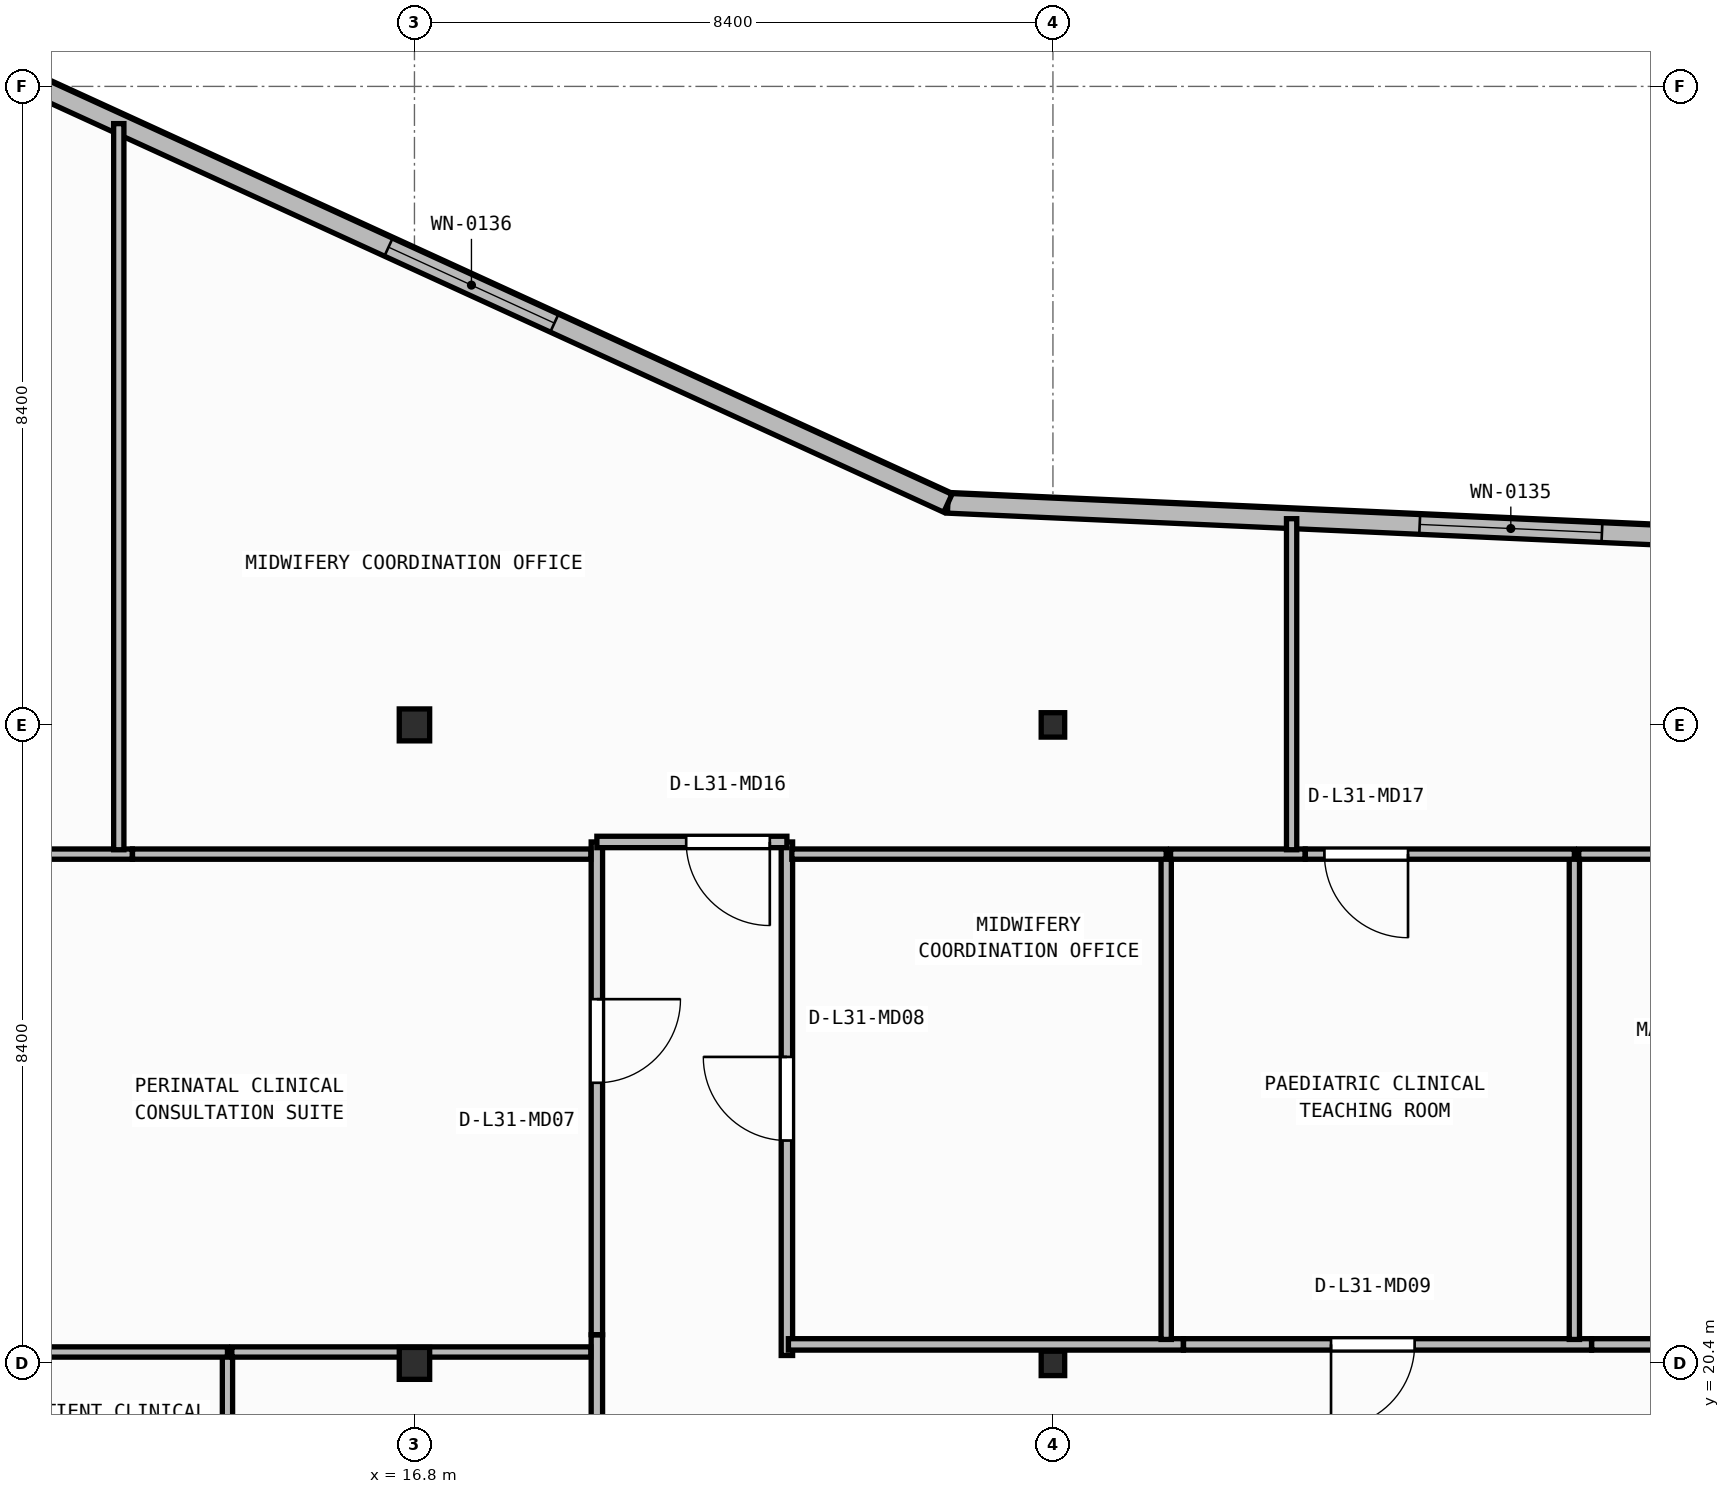
"""IFC4 building model, lengths in metres.
Left out: names, types, materials, properties, quantities, classifications, styles, units other than length and angle.
Written with IfcOpenShell. Run it as: python <this file> out.ifc"""

import sys

from ifc_helpers import new_model, si_unit, direction, frame, frame_2d, origin, origin_2d, place, context, subcontext, project, spatial, rectangle, i_section, extrude, element, fill, save


model = new_model("IFC4")
c1 = context("Model", 3, precision=1e-05, world=origin(), true_north=direction((0.0, 1.0)))
c2 = subcontext(c1, "Body", "Model", "MODEL_VIEW")
j1 = project(units=[si_unit("LENGTHUNIT", "METRE"), si_unit("PLANEANGLEUNIT", "RADIAN")], contexts=[c1])
p1 = place(None, origin())
s1 = spatial("IfcSite", under=j1, at=p1, CompositionType="ELEMENT")
p2 = place(p1, origin())
s2 = spatial("IfcBuilding", under=s1, at=p2, CompositionType="ELEMENT")
p3 = place(p2, frame((0.0, 0.0, 127.05)))
s3 = spatial("IfcBuildingStorey", under=s2, at=p3, CompositionType="ELEMENT", Elevation=127.05)
p4 = place(p3, frame((16.8, 20.4, 0.0), z_axis=(0.0, 0.0, 1.0), x_axis=(1.0, 0.0, 0.0)))
e1 = element("IfcColumn", 1, at=p4, inside=s3, PredefinedType="COLUMN", context=c2, shape_type="SweptSolid", body=[
    extrude(i_section(OverallWidth=0.4, OverallDepth=0.42, WebThickness=0.025, FlangeThickness=0.04, at=origin_2d()), origin(), (0.0, 0.0, 1.0), 3.95),
])
p5 = place(p3, frame((25.2, 20.4, 0.0), z_axis=(0.0, 0.0, 1.0), x_axis=(1.0, 0.0, 0.0)))
e2 = element("IfcColumn", 2, at=p5, inside=s3, PredefinedType="COLUMN", context=c2, shape_type="SweptSolid", body=[
    extrude(i_section(OverallWidth=0.309, OverallDepth=0.321, WebThickness=0.014, FlangeThickness=0.022, FilletRadius=0.017, at=origin_2d()), origin(), (0.0, 0.0, 1.0), 3.95),
])
p6 = place(p3, frame((16.8, 28.8, 0.0), z_axis=(0.0, 0.0, 1.0), x_axis=(1.0, 0.0, 0.0)))
e3 = element("IfcColumn", 3, at=p6, inside=s3, PredefinedType="COLUMN", context=c2, shape_type="SweptSolid", body=[
    extrude(i_section(OverallWidth=0.4, OverallDepth=0.42, WebThickness=0.025, FlangeThickness=0.04, at=origin_2d()), origin(), (0.0, 0.0, 1.0), 3.95),
])
p7 = place(p3, frame((25.2, 28.8, 0.0), z_axis=(0.0, 0.0, 1.0), x_axis=(1.0, 0.0, 0.0)))
e4 = element("IfcColumn", 4, at=p7, inside=s3, PredefinedType="COLUMN", context=c2, shape_type="SweptSolid", body=[
    extrude(i_section(OverallWidth=0.309, OverallDepth=0.321, WebThickness=0.014, FlangeThickness=0.022, FilletRadius=0.017, at=origin_2d()), origin(), (0.0, 0.0, 1.0), 3.95),
])
p8 = place(p3, frame((38.63, 31.052, 0.0), z_axis=(0.0, 0.0, 1.0), x_axis=(-0.998996592956, 0.044786239663, 0.0)))
e5 = element("IfcWall", 5, at=p8, inside=s3, PredefinedType="STANDARD", context=c2, shape_type="SweptSolid", body=[
    extrude(rectangle(XDim=14.827, YDim=0.26, at=frame_2d((7.414, 0.0))), origin(), (0.0, 0.0, 1.0), 3.71),
])
p9 = place(p8, frame((6.214, 0.0, 0.9)))
e6 = element("IfcOpeningElement", 6, at=p9, cuts=e5, PredefinedType="OPENING", context=c2, shape_type="SweptSolid", body=[
    extrude(rectangle(XDim=2.4, YDim=1.65, at=frame_2d((1.2, 0.825))), frame((0.0, 0.14, 0.0), z_axis=(0.0, -1.0, 0.0), x_axis=(1.0, 0.0, 0.0)), (0.0, 0.0, 1.0), 0.28),
])
p10 = place(p3, frame((23.818, 31.716, 0.0), z_axis=(0.0, 0.0, 1.0), x_axis=(-0.909209527513, 0.416338846471, 0.0)))
e7 = element("IfcWall", 7, at=p10, inside=s3, PredefinedType="STANDARD", context=c2, shape_type="SweptSolid", body=[
    extrude(rectangle(XDim=13.787, YDim=0.26, at=frame_2d((6.894, 0.0))), origin(), (0.0, 0.0, 1.0), 3.71),
])
p11 = place(p10, frame((5.694, 0.0, 0.9)))
e8 = element("IfcOpeningElement", 8, at=p11, cuts=e7, PredefinedType="OPENING", context=c2, shape_type="SweptSolid", body=[
    extrude(rectangle(XDim=2.4, YDim=1.65, at=frame_2d((1.2, 0.825))), frame((0.0, 0.14, 0.0), z_axis=(0.0, -1.0, 0.0), x_axis=(1.0, 0.0, 0.0)), (0.0, 0.0, 1.0), 0.28),
])
p12 = place(p3, frame((19.2, 20.776, 0.0), z_axis=(0.0, 0.0, 1.0), x_axis=(0.0, -1.0, 0.0)))
e9 = element("IfcWall", 9, at=p12, inside=s3, PredefinedType="PARTITIONING", context=c2, shape_type="SweptSolid", body=[
    extrude(rectangle(XDim=6.076, YDim=0.15, at=frame_2d((3.038, 0.0))), origin(), (0.0, 0.0, 1.0), 3.71),
])
p13 = place(p3, frame((19.2, 27.26, 0.0), z_axis=(0.0, 0.0, 1.0), x_axis=(0.0, -1.0, 0.0)))
e10 = element("IfcWall", 10, at=p13, inside=s3, PredefinedType="PARTITIONING", context=c2, shape_type="SweptSolid", body=[
    extrude(rectangle(XDim=6.482, YDim=0.15, at=frame_2d((3.241, 0.0))), origin(), (0.0, 0.0, 1.0), 3.71),
])
p14 = place(p13, frame((2.068, 0.0, 0.0)))
e11 = element("IfcOpeningElement", 11, at=p14, cuts=e10, PredefinedType="OPENING", context=c2, shape_type="SweptSolid", body=[
    extrude(rectangle(XDim=1.1, YDim=2.1, at=frame_2d((0.55, 1.05))), frame((0.0, 0.085, 0.0), z_axis=(0.0, -1.0, 0.0), x_axis=(1.0, 0.0, 0.0)), (0.0, 0.0, 1.0), 0.17),
])
p15 = place(p3, frame((21.7, 20.504, 0.0), z_axis=(0.0, 0.0, 1.0), x_axis=(0.0, 1.0, 0.0)))
e12 = element("IfcWall", 12, at=p15, inside=s3, PredefinedType="PARTITIONING", context=c2, shape_type="SweptSolid", body=[
    extrude(rectangle(XDim=6.756, YDim=0.15, at=frame_2d((3.378, 0.0))), origin(), (0.0, 0.0, 1.0), 3.71),
])
p16 = place(p15, frame((2.828, 0.0, 0.0)))
e13 = element("IfcOpeningElement", 13, at=p16, cuts=e12, PredefinedType="OPENING", context=c2, shape_type="SweptSolid", body=[
    extrude(rectangle(XDim=1.1, YDim=2.1, at=frame_2d((0.55, 1.05))), frame((0.0, 0.085, 0.0), z_axis=(0.0, -1.0, 0.0), x_axis=(1.0, 0.0, 0.0)), (0.0, 0.0, 1.0), 0.17),
])
p17 = place(p3, frame((21.7, 27.26, 0.0), z_axis=(0.0, 0.0, 1.0), x_axis=(-1.0, 0.0, 0.0)))
e14 = element("IfcWall", 14, at=p17, inside=s3, PredefinedType="PARTITIONING", context=c2, shape_type="SweptSolid", body=[
    extrude(rectangle(XDim=2.5, YDim=0.15, at=frame_2d((1.25, 0.0))), origin(), (0.0, 0.0, 1.0), 3.71),
])
p18 = place(p17, frame((0.225, 0.0, 0.0)))
e15 = element("IfcOpeningElement", 15, at=p18, cuts=e14, PredefinedType="OPENING", context=c2, shape_type="SweptSolid", body=[
    extrude(rectangle(XDim=1.1, YDim=2.1, at=frame_2d((0.55, 1.05))), frame((0.0, 0.085, 0.0), z_axis=(0.0, -1.0, 0.0), x_axis=(1.0, 0.0, 0.0)), (0.0, 0.0, 1.0), 0.17),
])
p19 = place(p3, frame((26.916, 20.65, 0.0), z_axis=(0.0, 0.0, 1.0), x_axis=(-1.0, 0.0, 0.0)))
e16 = element("IfcWall", 16, at=p19, inside=s3, PredefinedType="PARTITIONING", context=c2, shape_type="SweptSolid", body=[
    extrude(rectangle(XDim=5.196, YDim=0.15, at=frame_2d((2.598, 0.0))), origin(), (0.0, 0.0, 1.0), 3.083),
])
p20 = place(p3, frame((32.286, 20.65, 0.0), z_axis=(0.0, 0.0, 1.0), x_axis=(-1.0, 0.0, 0.0)))
e17 = element("IfcWall", 17, at=p20, inside=s3, PredefinedType="PARTITIONING", context=c2, shape_type="SweptSolid", body=[
    extrude(rectangle(XDim=5.368, YDim=0.15, at=frame_2d((2.684, 0.0))), origin(), (0.0, 0.0, 1.0), 3.083),
])
p21 = place(p20, frame((2.327, 0.0, 0.0)))
e18 = element("IfcOpeningElement", 18, at=p21, cuts=e17, PredefinedType="OPENING", context=c2, shape_type="SweptSolid", body=[
    extrude(rectangle(XDim=1.1, YDim=2.1, at=frame_2d((0.55, 1.05))), frame((0.0, 0.085, 0.0), z_axis=(0.0, -1.0, 0.0), x_axis=(1.0, 0.0, 0.0)), (0.0, 0.0, 1.0), 0.17),
])
p22 = place(p3, frame((36.856, 20.65, 0.0), z_axis=(0.0, 0.0, 1.0), x_axis=(-1.0, 0.0, 0.0)))
e19 = element("IfcWall", 19, at=p22, inside=s3, PredefinedType="PARTITIONING", context=c2, shape_type="SweptSolid", body=[
    extrude(rectangle(XDim=4.568, YDim=0.15, at=frame_2d((2.284, 0.0))), origin(), (0.0, 0.0, 1.0), 3.083),
])
p23 = place(p22, frame((0.354, 0.0, 0.0)))
e20 = element("IfcOpeningElement", 20, at=p23, cuts=e19, PredefinedType="OPENING", context=c2, shape_type="SweptSolid", body=[
    extrude(rectangle(XDim=1.1, YDim=2.1, at=frame_2d((0.55, 1.05))), frame((0.0, 0.085, 0.0), z_axis=(0.0, -1.0, 0.0), x_axis=(1.0, 0.0, 0.0)), (0.0, 0.0, 1.0), 0.17),
])
p24 = place(p3, frame((14.34, 17.833, 0.0), z_axis=(0.0, 0.0, 1.0), x_axis=(0.0, 1.0, 0.0)))
e21 = element("IfcWall", 21, at=p24, inside=s3, PredefinedType="PARTITIONING", context=c2, shape_type="SweptSolid", body=[
    extrude(rectangle(XDim=2.718, YDim=0.135, at=frame_2d((1.359, 0.0))), origin(), (0.0, 0.0, 1.0), 3.71),
])
p25 = place(p3, frame((14.34, 20.55, 0.0), z_axis=(0.0, 0.0, 1.0), x_axis=(-1.0, 0.0, 0.0)))
e22 = element("IfcWall", 22, at=p25, inside=s3, PredefinedType="PARTITIONING", context=c2, shape_type="SweptSolid", body=[
    extrude(rectangle(XDim=4.282, YDim=0.135, at=frame_2d((2.141, 0.0))), origin(), (0.0, 0.0, 1.0), 3.083),
])
p26 = place(p3, frame((19.12, 20.55, 0.0), z_axis=(0.0, 0.0, 1.0), x_axis=(-1.0, 0.0, 0.0)))
e23 = element("IfcWall", 23, at=p26, inside=s3, PredefinedType="PARTITIONING", context=c2, shape_type="SweptSolid", body=[
    extrude(rectangle(XDim=4.723, YDim=0.135, at=frame_2d((2.361, 0.0))), origin(), (0.0, 0.0, 1.0), 3.083),
])
p27 = place(p3, frame((13.088, 27.1, 0.0), z_axis=(0.0, 0.0, 1.0), x_axis=(-1.0, 0.0, 0.0)))
e24 = element("IfcWall", 24, at=p27, inside=s3, PredefinedType="PARTITIONING", context=c2, shape_type="SweptSolid", body=[
    extrude(rectangle(XDim=1.951, YDim=0.135, at=frame_2d((0.976, 0.0))), origin(), (0.0, 0.0, 1.0), 3.71),
])
p28 = place(p3, frame((19.12, 27.1, 0.0), z_axis=(0.0, 0.0, 1.0), x_axis=(-1.0, 0.0, 0.0)))
e25 = element("IfcWall", 25, at=p28, inside=s3, PredefinedType="PARTITIONING", context=c2, shape_type="SweptSolid", body=[
    extrude(rectangle(XDim=6.03, YDim=0.135, at=frame_2d((3.015, 0.0))), origin(), (0.0, 0.0, 1.0), 3.71),
])
p29 = place(p3, frame((26.69, 20.715, 0.0), z_axis=(0.0, 0.0, 1.0), x_axis=(0.0, 1.0, 0.0)))
e26 = element("IfcWall", 26, at=p29, inside=s3, PredefinedType="PARTITIONING", context=c2, shape_type="SweptSolid", body=[
    extrude(rectangle(XDim=6.385, YDim=0.135, at=frame_2d((3.192, 0.0))), origin(), (0.0, 0.0, 1.0), 3.71),
])
p30 = place(p3, frame((26.69, 27.1, 0.0), z_axis=(0.0, 0.0, 1.0), x_axis=(-1.0, 0.0, 0.0)))
e27 = element("IfcWall", 27, at=p30, inside=s3, PredefinedType="PARTITIONING", context=c2, shape_type="SweptSolid", body=[
    extrude(rectangle(XDim=4.925, YDim=0.135, at=frame_2d((2.462, 0.0))), origin(), (0.0, 0.0, 1.0), 3.71),
])
p31 = place(p3, frame((32.06, 20.715, 0.0), z_axis=(0.0, 0.0, 1.0), x_axis=(0.0, 1.0, 0.0)))
e28 = element("IfcWall", 28, at=p31, inside=s3, PredefinedType="PARTITIONING", context=c2, shape_type="SweptSolid", body=[
    extrude(rectangle(XDim=6.385, YDim=0.135, at=frame_2d((3.192, 0.0))), origin(), (0.0, 0.0, 1.0), 3.71),
])
p32 = place(p3, frame((28.519, 27.1, 0.0), z_axis=(0.0, 0.0, 1.0), x_axis=(-1.0, 0.0, 0.0)))
e29 = element("IfcWall", 29, at=p32, inside=s3, PredefinedType="PARTITIONING", context=c2, shape_type="SweptSolid", body=[
    extrude(rectangle(XDim=1.771, YDim=0.135, at=frame_2d((0.885, 0.0))), origin(), (0.0, 0.0, 1.0), 3.71),
])
p33 = place(p3, frame((32.06, 27.1, 0.0), z_axis=(0.0, 0.0, 1.0), x_axis=(-1.0, 0.0, 0.0)))
e30 = element("IfcWall", 30, at=p33, inside=s3, PredefinedType="PARTITIONING", context=c2, shape_type="SweptSolid", body=[
    extrude(rectangle(XDim=3.54, YDim=0.135, at=frame_2d((1.77, 0.0))), origin(), (0.0, 0.0, 1.0), 3.71),
])
p34 = place(p33, frame((2.188, 0.0, 0.0)))
e31 = element("IfcOpeningElement", 31, at=p34, cuts=e30, PredefinedType="OPENING", context=c2, shape_type="SweptSolid", body=[
    extrude(rectangle(XDim=1.1, YDim=2.1, at=frame_2d((0.55, 1.05))), frame((0.0, 0.077, 0.0), z_axis=(0.0, -1.0, 0.0), x_axis=(1.0, 0.0, 0.0)), (0.0, 0.0, 1.0), 0.155),
])
p35 = place(p3, frame((36.63, 27.1, 0.0), z_axis=(0.0, 0.0, 1.0), x_axis=(-1.0, 0.0, 0.0)))
e32 = element("IfcWall", 32, at=p35, inside=s3, PredefinedType="PARTITIONING", context=c2, shape_type="SweptSolid", body=[
    extrude(rectangle(XDim=4.512, YDim=0.135, at=frame_2d((2.256, 0.0))), origin(), (0.0, 0.0, 1.0), 3.71),
])
p36 = place(p3, frame((12.91, 27.157, 0.0), z_axis=(0.0, 0.0, 1.0), x_axis=(0.0, 1.0, 0.0)))
e33 = element("IfcWall", 33, at=p36, inside=s3, PredefinedType="PARTITIONING", context=c2, shape_type="SweptSolid", body=[
    extrude(rectangle(XDim=9.553, YDim=0.135, at=frame_2d((4.776, 0.0))), origin(), (0.0, 0.0, 1.0), 3.71),
])
p37 = place(p3, frame((28.34, 27.157, 0.0), z_axis=(0.0, 0.0, 1.0), x_axis=(0.0, 1.0, 0.0)))
e34 = element("IfcWall", 34, at=p37, inside=s3, PredefinedType="PARTITIONING", context=c2, shape_type="SweptSolid", body=[
    extrude(rectangle(XDim=4.355, YDim=0.135, at=frame_2d((2.178, 0.0))), origin(), (0.0, 0.0, 1.0), 3.71),
])
p38 = place(p9, origin())
e35 = element("IfcWindow", 35, at=p38, inside=s3, PartitioningType="SINGLE_PANEL", PredefinedType="WINDOW", context=c2, shape_type="SweptSolid", body=[
    extrude(rectangle(XDim=2.4, YDim=1.65, at=frame_2d((1.2, 0.825))), frame((0.0, 0.03, 0.0), z_axis=(0.0, -1.0, 0.0), x_axis=(1.0, 0.0, 0.0)), (0.0, 0.0, 1.0), 0.06),
])
fill(e6, e35)
p39 = place(p11, origin())
e36 = element("IfcWindow", 36, at=p39, inside=s3, PartitioningType="SINGLE_PANEL", PredefinedType="WINDOW", context=c2, shape_type="SweptSolid", body=[
    extrude(rectangle(XDim=2.4, YDim=1.65, at=frame_2d((1.2, 0.825))), frame((0.0, 0.03, 0.0), z_axis=(0.0, -1.0, 0.0), x_axis=(1.0, 0.0, 0.0)), (0.0, 0.0, 1.0), 0.06),
])
fill(e8, e36)
p40 = place(p14, origin())
e37 = element("IfcDoor", 37, at=p40, inside=s3, OperationType="SINGLE_SWING_LEFT", PredefinedType="DOOR", context=c2, shape_type="SweptSolid", body=[
    extrude(rectangle(XDim=1.1, YDim=2.1, at=frame_2d((0.55, 1.05))), frame((0.0, 0.025, 0.0), z_axis=(0.0, -1.0, 0.0), x_axis=(1.0, 0.0, 0.0)), (0.0, 0.0, 1.0), 0.05),
])
fill(e11, e37)
p41 = place(p16, origin())
e38 = element("IfcDoor", 38, at=p41, inside=s3, OperationType="SINGLE_SWING_RIGHT", PredefinedType="DOOR", context=c2, shape_type="SweptSolid", body=[
    extrude(rectangle(XDim=1.1, YDim=2.1, at=frame_2d((0.55, 1.05))), frame((0.0, 0.025, 0.0), z_axis=(0.0, -1.0, 0.0), x_axis=(1.0, 0.0, 0.0)), (0.0, 0.0, 1.0), 0.05),
])
fill(e13, e38)
p42 = place(p18, origin())
e39 = element("IfcDoor", 39, at=p42, inside=s3, OperationType="SINGLE_SWING_LEFT", PredefinedType="DOOR", context=c2, shape_type="SweptSolid", body=[
    extrude(rectangle(XDim=1.1, YDim=2.1, at=frame_2d((0.55, 1.05))), frame((0.0, 0.025, 0.0), z_axis=(0.0, -1.0, 0.0), x_axis=(1.0, 0.0, 0.0)), (0.0, 0.0, 1.0), 0.05),
])
fill(e15, e39)
p43 = place(p21, origin())
e40 = element("IfcDoor", 40, at=p43, inside=s3, OperationType="SINGLE_SWING_RIGHT", PredefinedType="DOOR", context=c2, shape_type="SweptSolid", body=[
    extrude(rectangle(XDim=1.1, YDim=2.1, at=frame_2d((0.55, 1.05))), frame((0.0, 0.025, 0.0), z_axis=(0.0, -1.0, 0.0), x_axis=(1.0, 0.0, 0.0)), (0.0, 0.0, 1.0), 0.05),
])
fill(e18, e40)
p44 = place(p34, origin())
e41 = element("IfcDoor", 41, at=p44, inside=s3, OperationType="SINGLE_SWING_LEFT", PredefinedType="DOOR", context=c2, shape_type="SweptSolid", body=[
    extrude(rectangle(XDim=1.1, YDim=2.1, at=frame_2d((0.55, 1.05))), frame((0.0, 0.025, 0.0), z_axis=(0.0, -1.0, 0.0), x_axis=(1.0, 0.0, 0.0)), (0.0, 0.0, 1.0), 0.05),
])
fill(e31, e41)
save(model, sys.argv[1])
